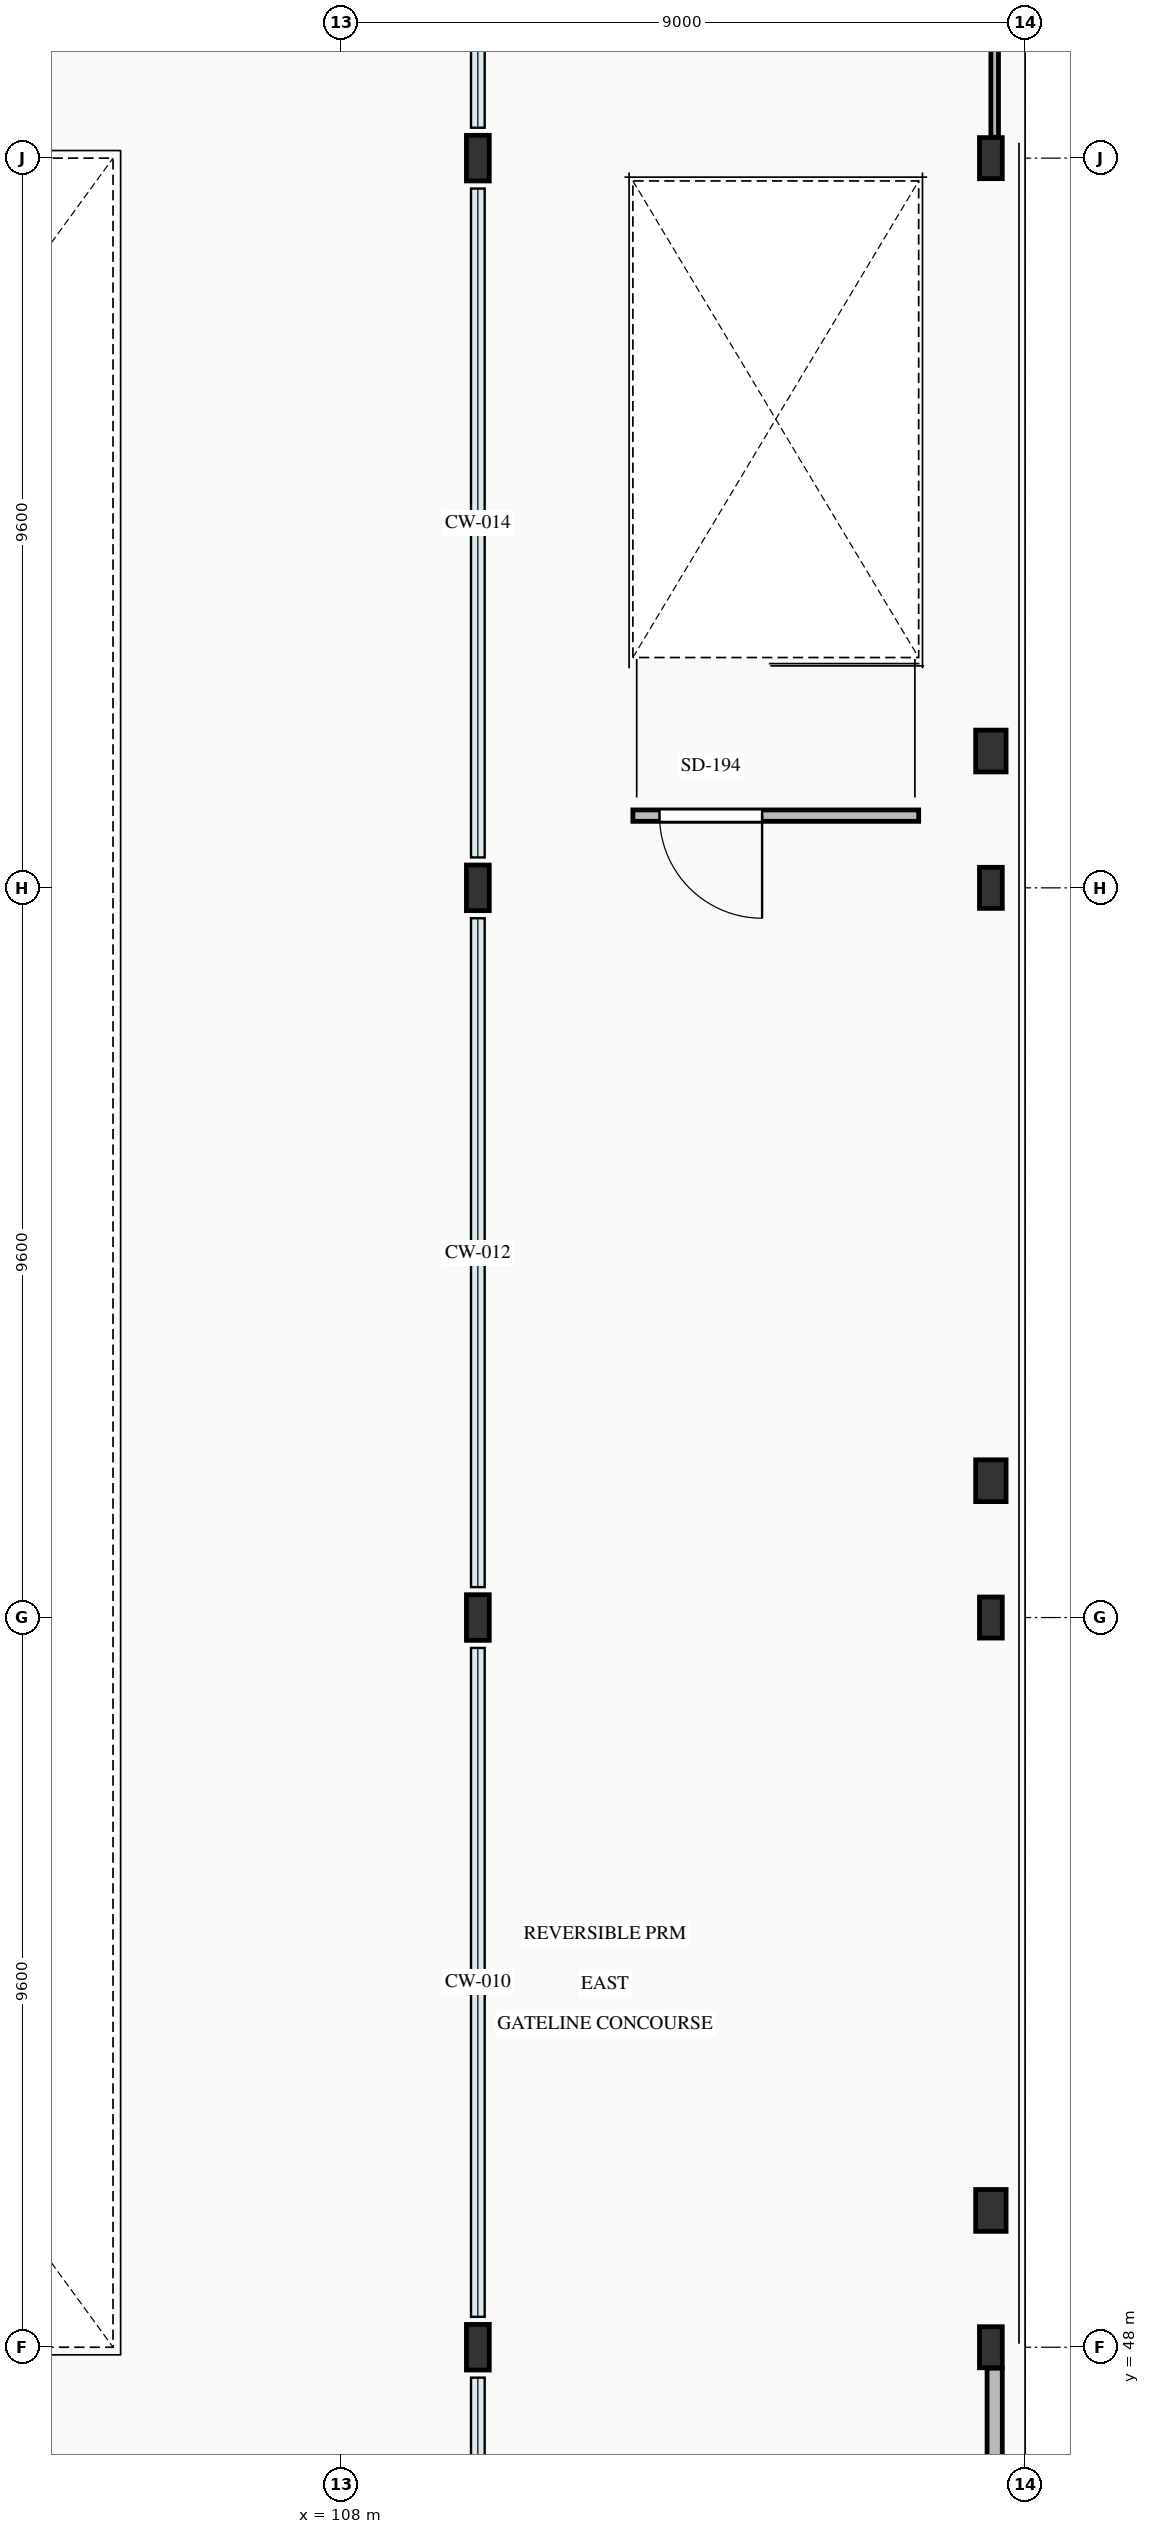
"""IFC4 building model, lengths in metres.
Left out: names, types, materials, properties, quantities, classifications, styles, units other than length and angle.
Written with IfcOpenShell. Run it as: python <this file> out.ifc"""

import sys

from ifc_helpers import new_model, si_unit, direction, frame, frame_2d, origin, origin_2d, place, context, subcontext, project, spatial, rectangle, i_section, extrude, element, fill, save


model = new_model("IFC4")
c1 = context("Model", 3, precision=1e-05, world=origin(), true_north=direction((0.0, 1.0)))
c2 = subcontext(c1, "Body", "Model", "MODEL_VIEW")
j1 = project(units=[si_unit("LENGTHUNIT", "METRE"), si_unit("PLANEANGLEUNIT", "RADIAN")], contexts=[c1])
p1 = place(None, origin())
s1 = spatial("IfcSite", under=j1, at=p1, CompositionType="ELEMENT")
p2 = place(p1, origin())
s2 = spatial("IfcBuilding", under=s1, at=p2, CompositionType="ELEMENT")
p3 = place(p2, frame((0.0, 0.0, 6.0)))
s3 = spatial("IfcBuildingStorey", under=s2, at=p3, CompositionType="ELEMENT", Elevation=6.0)
p4 = place(p3, frame((116.55, 48.0, 0.0), z_axis=(0.0, 0.0, 1.0), x_axis=(1.0, 0.0, 0.0)))
e1 = element("IfcColumn", 1, at=p4, inside=s3, PredefinedType="COLUMN", context=c2, shape_type="SweptSolid", body=[
    extrude(i_section(OverallWidth=0.3, OverallDepth=0.54, WebThickness=0.012, FlangeThickness=0.024, FilletRadius=0.027, at=origin_2d()), origin(), (0.0, 0.0, 1.0), 4.8),
])
p5 = place(p3, frame((109.8, 48.0, 0.0), z_axis=(0.0, 0.0, 1.0), x_axis=(1.0, 0.0, 0.0)))
e2 = element("IfcColumn", 2, at=p5, inside=s3, PredefinedType="COLUMN", context=c2, shape_type="SweptSolid", body=[
    extrude(i_section(OverallWidth=0.3, OverallDepth=0.6, WebThickness=0.015, FlangeThickness=0.03, FilletRadius=0.027, at=origin_2d()), origin(), (0.0, 0.0, 1.0), 4.8),
])
p6 = place(p3, frame((116.55, 57.6, 0.0), z_axis=(0.0, 0.0, 1.0), x_axis=(1.0, 0.0, 0.0)))
e3 = element("IfcColumn", 3, at=p6, inside=s3, PredefinedType="COLUMN", context=c2, shape_type="SweptSolid", body=[
    extrude(i_section(OverallWidth=0.3, OverallDepth=0.54, WebThickness=0.012, FlangeThickness=0.024, FilletRadius=0.027, at=origin_2d()), origin(), (0.0, 0.0, 1.0), 4.8),
])
p7 = place(p3, frame((109.8, 57.6, 0.0), z_axis=(0.0, 0.0, 1.0), x_axis=(1.0, 0.0, 0.0)))
e4 = element("IfcColumn", 4, at=p7, inside=s3, PredefinedType="COLUMN", context=c2, shape_type="SweptSolid", body=[
    extrude(i_section(OverallWidth=0.3, OverallDepth=0.6, WebThickness=0.015, FlangeThickness=0.03, FilletRadius=0.027, at=origin_2d()), origin(), (0.0, 0.0, 1.0), 4.8),
])
p8 = place(p3, frame((116.55, 67.2, 0.0), z_axis=(0.0, 0.0, 1.0), x_axis=(1.0, 0.0, 0.0)))
e5 = element("IfcColumn", 5, at=p8, inside=s3, PredefinedType="COLUMN", context=c2, shape_type="SweptSolid", body=[
    extrude(i_section(OverallWidth=0.3, OverallDepth=0.54, WebThickness=0.012, FlangeThickness=0.024, FilletRadius=0.027, at=origin_2d()), origin(), (0.0, 0.0, 1.0), 4.8),
])
p9 = place(p3, frame((109.8, 67.2, 0.0), z_axis=(0.0, 0.0, 1.0), x_axis=(1.0, 0.0, 0.0)))
e6 = element("IfcColumn", 6, at=p9, inside=s3, PredefinedType="COLUMN", context=c2, shape_type="SweptSolid", body=[
    extrude(i_section(OverallWidth=0.3, OverallDepth=0.6, WebThickness=0.015, FlangeThickness=0.03, FilletRadius=0.027, at=origin_2d()), origin(), (0.0, 0.0, 1.0), 4.8),
])
p10 = place(p3, frame((116.55, 76.8, 0.0), z_axis=(0.0, 0.0, 1.0), x_axis=(1.0, 0.0, 0.0)))
e7 = element("IfcColumn", 7, at=p10, inside=s3, PredefinedType="COLUMN", context=c2, shape_type="SweptSolid", body=[
    extrude(i_section(OverallWidth=0.3, OverallDepth=0.54, WebThickness=0.012, FlangeThickness=0.024, FilletRadius=0.027, at=origin_2d()), origin(), (0.0, 0.0, 1.0), 4.8),
])
p11 = place(p3, frame((109.8, 76.8, 0.0), z_axis=(0.0, 0.0, 1.0), x_axis=(1.0, 0.0, 0.0)))
e8 = element("IfcColumn", 8, at=p11, inside=s3, PredefinedType="COLUMN", context=c2, shape_type="SweptSolid", body=[
    extrude(i_section(OverallWidth=0.3, OverallDepth=0.6, WebThickness=0.015, FlangeThickness=0.03, FilletRadius=0.027, at=origin_2d()), origin(), (0.0, 0.0, 1.0), 4.8),
])
for number, where, z_axis, x_axis in (
    (9, (116.55, 49.8, 0.0), (0.0, 0.0, 1.0), (1.0, 0.0, 0.0)),
    (10, (116.55, 59.4, 0.0), (0.0, 0.0, 1.0), (1.0, 0.0, 0.0)),
    (11, (116.55, 69.0, 0.0), (0.0, 0.0, 1.0), (1.0, 0.0, 0.0)),
):
    element("IfcColumn", number, at=place(p3, frame(where, z_axis=z_axis, x_axis=x_axis)), inside=s3, PredefinedType="PILASTER", context=c2, shape_type="SweptSolid", body=[
        extrude(rectangle(XDim=0.4, YDim=0.55, at=origin_2d()), origin(), (0.0, 0.0, 1.0), 4.8),
    ])
p12 = place(p3, frame((111.84, 68.15, 0.0), z_axis=(0.0, 0.0, 1.0), x_axis=(1.0, 0.0, 0.0)))
e12 = element("IfcWall", 12, at=p12, inside=s3, PredefinedType="PARTITIONING", context=c2, shape_type="SweptSolid", body=[
    extrude(rectangle(XDim=3.76, YDim=0.15, at=frame_2d((1.88, 0.0))), origin(), (0.0, 0.0, 1.0), 4.53),
])
p13 = place(p12, frame((0.35, 0.0, 0.0)))
e13 = element("IfcOpeningElement", 13, at=p13, cuts=e12, PredefinedType="OPENING", context=c2, shape_type="SweptSolid", body=[
    extrude(rectangle(XDim=1.35, YDim=2.2, at=frame_2d((0.675, 1.1))), frame((0.0, 0.09, 0.0), z_axis=(0.0, -1.0, 0.0), x_axis=(1.0, 0.0, 0.0)), (0.0, 0.0, 1.0), 0.18),
])
p14 = place(p3, frame((116.6, 38.905, 0.0), z_axis=(0.0, 0.0, 1.0), x_axis=(0.0, 1.0, 0.0)))
e14 = element("IfcWall", 14, at=p14, inside=s3, PredefinedType="PARTITIONING", context=c2, shape_type="SweptSolid", body=[
    extrude(rectangle(XDim=8.82, YDim=0.2, at=frame_2d((4.41, 0.0))), origin(), (0.0, 0.0, 1.0), 4.53),
])
p15 = place(p3, frame((116.6, 77.075, 0.0), z_axis=(0.0, 0.0, 1.0), x_axis=(0.0, 1.0, 0.0)))
e15 = element("IfcWall", 15, at=p15, inside=s3, PredefinedType="PARTITIONING", context=c2, shape_type="SweptSolid", body=[
    extrude(rectangle(XDim=9.05, YDim=0.1, at=frame_2d((4.525, 0.0))), origin(), (0.0, 0.0, 1.0), 4.53),
])
p16 = place(p13, frame((1.35, 0.0, 0.0), z_axis=(0.0, 0.0, 1.0), x_axis=(-1.0, 0.0, 0.0)))
e16 = element("IfcDoor", 16, at=p16, inside=s3, OperationType="SINGLE_SWING_RIGHT", PredefinedType="DOOR", context=c2, shape_type="SweptSolid", body=[
    extrude(rectangle(XDim=1.35, YDim=2.2, at=frame_2d((0.675, 1.1))), frame((0.0, 0.025, 0.0), z_axis=(0.0, -1.0, 0.0), x_axis=(1.0, 0.0, 0.0)), (0.0, 0.0, 1.0), 0.05),
])
fill(e13, e16)
save(model, sys.argv[1])
